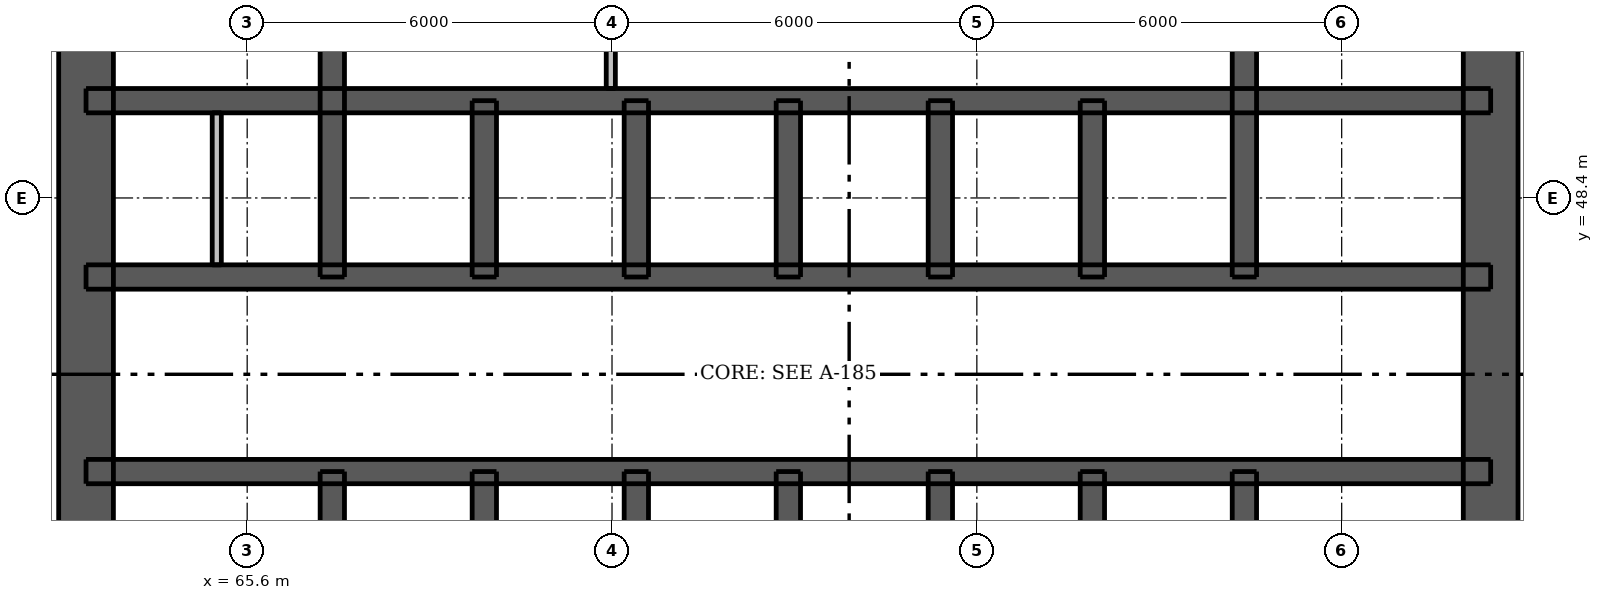
"""IFC4 building model, lengths in metres.
Left out: names, types, materials, properties, quantities, classifications, styles, units other than length and angle.
Written with IfcOpenShell. Run it as: python <this file> out.ifc"""

import sys

from ifc_helpers import new_model, si_unit, direction, frame, frame_2d, origin, place, context, subcontext, project, spatial, rectangle, extrude, element, fill, save


model = new_model("IFC4")
c1 = context("Model", 3, precision=1e-05, world=origin(), true_north=direction((0.0, 1.0)))
c2 = subcontext(c1, "Body", "Model", "MODEL_VIEW")
j1 = project(units=[si_unit("LENGTHUNIT", "METRE"), si_unit("PLANEANGLEUNIT", "RADIAN")], contexts=[c1])
p1 = place(None, origin())
s1 = spatial("IfcSite", under=j1, at=p1, CompositionType="ELEMENT")
p2 = place(p1, origin())
s2 = spatial("IfcBuilding", under=s1, at=p2, CompositionType="ELEMENT")
p3 = place(p2, frame((0.0, 0.0, 23.5)))
s3 = spatial("IfcBuildingStorey", under=s2, at=p3, CompositionType="ELEMENT", Elevation=23.5)
p4 = place(p3, frame((62.95, 33.5, 0.0), z_axis=(0.0, 0.0, 1.0), x_axis=(0.0, 1.0, 0.0)))
e1 = element("IfcWall", 1, at=p4, inside=s3, PredefinedType="SHEAR", context=c2, shape_type="SweptSolid", body=[
    extrude(rectangle(XDim=24.0, YDim=0.9, at=frame_2d((12.0, 0.0))), origin(), (0.0, 0.0, 1.0), 3.05),
])
p5 = place(p4, frame((11.2, 0.0, 0.0)))
e2 = element("IfcOpeningElement", 2, at=p5, cuts=e1, PredefinedType="OPENING", context=c2, shape_type="SweptSolid", body=[
    extrude(rectangle(XDim=1.6, YDim=2.1, at=frame_2d((0.8, 1.05))), frame((0.0, 0.46, 0.0), z_axis=(0.0, -1.0, 0.0), x_axis=(1.0, 0.0, 0.0)), (0.0, 0.0, 1.0), 0.92),
])
p6 = place(p3, frame((86.05, 33.5, 0.0), z_axis=(0.0, 0.0, 1.0), x_axis=(0.0, 1.0, 0.0)))
e3 = element("IfcWall", 3, at=p6, inside=s3, PredefinedType="SHEAR", context=c2, shape_type="SweptSolid", body=[
    extrude(rectangle(XDim=24.0, YDim=0.9, at=frame_2d((12.0, 0.0))), origin(), (0.0, 0.0, 1.0), 3.05),
])
p7 = place(p6, frame((11.2, 0.0, 0.0)))
e4 = element("IfcOpeningElement", 4, at=p7, cuts=e3, PredefinedType="OPENING", context=c2, shape_type="SweptSolid", body=[
    extrude(rectangle(XDim=1.6, YDim=2.1, at=frame_2d((0.8, 1.05))), frame((0.0, 0.46, 0.0), z_axis=(0.0, -1.0, 0.0), x_axis=(1.0, 0.0, 0.0)), (0.0, 0.0, 1.0), 0.92),
])
p8 = place(p3, frame((62.95, 43.9, 0.0), z_axis=(0.0, 0.0, 1.0), x_axis=(1.0, 0.0, 0.0)))
e5 = element("IfcWall", 5, at=p8, inside=s3, PredefinedType="SHEAR", context=c2, shape_type="SweptSolid", body=[
    extrude(rectangle(XDim=23.1, YDim=0.4, at=frame_2d((11.55, 0.0))), origin(), (0.0, 0.0, 1.0), 3.05),
])
p9 = place(p8, frame((1.7, 0.0, 0.0)))
e6 = element("IfcOpeningElement", 6, at=p9, cuts=e5, PredefinedType="OPENING", context=c2, shape_type="SweptSolid", body=[
    extrude(rectangle(XDim=0.9, YDim=2.1, at=frame_2d((0.45, 1.05))), frame((0.0, 0.21, 0.0), z_axis=(0.0, -1.0, 0.0), x_axis=(1.0, 0.0, 0.0)), (0.0, 0.0, 1.0), 0.42),
])
p10 = place(p8, frame((20.5, 0.0, 0.0)))
e7 = element("IfcOpeningElement", 7, at=p10, cuts=e5, PredefinedType="OPENING", context=c2, shape_type="SweptSolid", body=[
    extrude(rectangle(XDim=0.9, YDim=2.1, at=frame_2d((0.45, 1.05))), frame((0.0, 0.21, 0.0), z_axis=(0.0, -1.0, 0.0), x_axis=(1.0, 0.0, 0.0)), (0.0, 0.0, 1.0), 0.42),
])
p11 = place(p8, frame((4.75, 0.0, 0.0)))
e8 = element("IfcOpeningElement", 8, at=p11, cuts=e5, PredefinedType="OPENING", context=c2, shape_type="SweptSolid", body=[
    extrude(rectangle(XDim=1.1, YDim=2.1, at=frame_2d((0.55, 1.05))), frame((0.0, 0.21, 0.0), z_axis=(0.0, -1.0, 0.0), x_axis=(1.0, 0.0, 0.0)), (0.0, 0.0, 1.0), 0.42),
])
p12 = place(p8, frame((7.25, 0.0, 0.0)))
e9 = element("IfcOpeningElement", 9, at=p12, cuts=e5, PredefinedType="OPENING", context=c2, shape_type="SweptSolid", body=[
    extrude(rectangle(XDim=1.1, YDim=2.1, at=frame_2d((0.55, 1.05))), frame((0.0, 0.21, 0.0), z_axis=(0.0, -1.0, 0.0), x_axis=(1.0, 0.0, 0.0)), (0.0, 0.0, 1.0), 0.42),
])
p13 = place(p8, frame((9.75, 0.0, 0.0)))
e10 = element("IfcOpeningElement", 10, at=p13, cuts=e5, PredefinedType="OPENING", context=c2, shape_type="SweptSolid", body=[
    extrude(rectangle(XDim=1.1, YDim=2.1, at=frame_2d((0.55, 1.05))), frame((0.0, 0.21, 0.0), z_axis=(0.0, -1.0, 0.0), x_axis=(1.0, 0.0, 0.0)), (0.0, 0.0, 1.0), 0.42),
])
p14 = place(p8, frame((12.25, 0.0, 0.0)))
e11 = element("IfcOpeningElement", 11, at=p14, cuts=e5, PredefinedType="OPENING", context=c2, shape_type="SweptSolid", body=[
    extrude(rectangle(XDim=1.1, YDim=2.1, at=frame_2d((0.55, 1.05))), frame((0.0, 0.21, 0.0), z_axis=(0.0, -1.0, 0.0), x_axis=(1.0, 0.0, 0.0)), (0.0, 0.0, 1.0), 0.42),
])
p15 = place(p8, frame((14.75, 0.0, 0.0)))
e12 = element("IfcOpeningElement", 12, at=p15, cuts=e5, PredefinedType="OPENING", context=c2, shape_type="SweptSolid", body=[
    extrude(rectangle(XDim=1.1, YDim=2.1, at=frame_2d((0.55, 1.05))), frame((0.0, 0.21, 0.0), z_axis=(0.0, -1.0, 0.0), x_axis=(1.0, 0.0, 0.0)), (0.0, 0.0, 1.0), 0.42),
])
p16 = place(p8, frame((17.25, 0.0, 0.0)))
e13 = element("IfcOpeningElement", 13, at=p16, cuts=e5, PredefinedType="OPENING", context=c2, shape_type="SweptSolid", body=[
    extrude(rectangle(XDim=1.1, YDim=2.1, at=frame_2d((0.55, 1.05))), frame((0.0, 0.21, 0.0), z_axis=(0.0, -1.0, 0.0), x_axis=(1.0, 0.0, 0.0)), (0.0, 0.0, 1.0), 0.42),
])
p17 = place(p3, frame((62.95, 47.1, 0.0), z_axis=(0.0, 0.0, 1.0), x_axis=(1.0, 0.0, 0.0)))
e14 = element("IfcWall", 14, at=p17, inside=s3, PredefinedType="SHEAR", context=c2, shape_type="SweptSolid", body=[
    extrude(rectangle(XDim=23.1, YDim=0.4, at=frame_2d((11.55, 0.0))), origin(), (0.0, 0.0, 1.0), 3.05),
])
p18 = place(p17, frame((0.85, 0.0, 0.0)))
e15 = element("IfcOpeningElement", 15, at=p18, cuts=e14, PredefinedType="OPENING", context=c2, shape_type="SweptSolid", body=[
    extrude(rectangle(XDim=0.9, YDim=2.1, at=frame_2d((0.45, 1.05))), frame((0.0, 0.21, 0.0), z_axis=(0.0, -1.0, 0.0), x_axis=(1.0, 0.0, 0.0)), (0.0, 0.0, 1.0), 0.42),
])
p19 = place(p17, frame((2.55, 0.0, 0.0)))
e16 = element("IfcOpeningElement", 16, at=p19, cuts=e14, PredefinedType="OPENING", context=c2, shape_type="SweptSolid", body=[
    extrude(rectangle(XDim=0.9, YDim=2.1, at=frame_2d((0.45, 1.05))), frame((0.0, 0.21, 0.0), z_axis=(0.0, -1.0, 0.0), x_axis=(1.0, 0.0, 0.0)), (0.0, 0.0, 1.0), 0.42),
])
p20 = place(p17, frame((20.5, 0.0, 0.0)))
e17 = element("IfcOpeningElement", 17, at=p20, cuts=e14, PredefinedType="OPENING", context=c2, shape_type="SweptSolid", body=[
    extrude(rectangle(XDim=0.9, YDim=2.1, at=frame_2d((0.45, 1.05))), frame((0.0, 0.21, 0.0), z_axis=(0.0, -1.0, 0.0), x_axis=(1.0, 0.0, 0.0)), (0.0, 0.0, 1.0), 0.42),
])
p21 = place(p3, frame((62.95, 50.0, 0.0), z_axis=(0.0, 0.0, 1.0), x_axis=(1.0, 0.0, 0.0)))
e18 = element("IfcWall", 18, at=p21, inside=s3, PredefinedType="SHEAR", context=c2, shape_type="SweptSolid", body=[
    extrude(rectangle(XDim=23.1, YDim=0.4, at=frame_2d((11.55, 0.0))), origin(), (0.0, 0.0, 1.0), 3.05),
])
p22 = place(p3, frame((67.0, 33.95, 0.0), z_axis=(0.0, 0.0, 1.0), x_axis=(0.0, 1.0, 0.0)))
e19 = element("IfcWall", 19, at=p22, inside=s3, PredefinedType="SHEAR", context=c2, shape_type="SweptSolid", body=[
    extrude(rectangle(XDim=9.95, YDim=0.4, at=frame_2d((4.975, 0.0))), origin(), (0.0, 0.0, 1.0), 3.05),
])
p23 = place(p22, frame((0.65, 0.0, 0.0)))
e20 = element("IfcOpeningElement", 20, at=p23, cuts=e19, PredefinedType="OPENING", context=c2, shape_type="SweptSolid", body=[
    extrude(rectangle(XDim=1.1, YDim=2.1, at=frame_2d((0.55, 1.05))), frame((0.0, 0.21, 0.0), z_axis=(0.0, -1.0, 0.0), x_axis=(1.0, 0.0, 0.0)), (0.0, 0.0, 1.0), 0.42),
])
for number, where, z_axis, x_axis in (
    (21, (67.0, 47.1, 0.0), (0.0, 0.0, 1.0), (0.0, 1.0, 0.0)),
    (22, (82.0, 33.95, 0.0), (0.0, 0.0, 1.0), (0.0, 1.0, 0.0)),
    (23, (82.0, 47.1, 0.0), (0.0, 0.0, 1.0), (0.0, 1.0, 0.0)),
):
    element("IfcWall", number, at=place(p3, frame(where, z_axis=z_axis, x_axis=x_axis)), inside=s3, PredefinedType="SHEAR", context=c2, shape_type="SweptSolid", body=[
        extrude(rectangle(XDim=9.95, YDim=0.4, at=frame_2d((4.975, 0.0))), origin(), (0.0, 0.0, 1.0), 3.05),
    ])
for number, where, z_axis, x_axis in (
    (24, (69.5, 41.0, 0.0), (0.0, 0.0, 1.0), (0.0, 1.0, 0.0)),
    (25, (69.5, 47.1, 0.0), (0.0, 0.0, 1.0), (0.0, 1.0, 0.0)),
    (26, (72.0, 41.0, 0.0), (0.0, 0.0, 1.0), (0.0, 1.0, 0.0)),
    (27, (72.0, 47.1, 0.0), (0.0, 0.0, 1.0), (0.0, 1.0, 0.0)),
    (28, (74.5, 41.0, 0.0), (0.0, 0.0, 1.0), (0.0, 1.0, 0.0)),
    (29, (74.5, 47.1, 0.0), (0.0, 0.0, 1.0), (0.0, 1.0, 0.0)),
    (30, (77.0, 41.0, 0.0), (0.0, 0.0, 1.0), (0.0, 1.0, 0.0)),
    (31, (77.0, 47.1, 0.0), (0.0, 0.0, 1.0), (0.0, 1.0, 0.0)),
    (32, (79.5, 41.0, 0.0), (0.0, 0.0, 1.0), (0.0, 1.0, 0.0)),
    (33, (79.5, 47.1, 0.0), (0.0, 0.0, 1.0), (0.0, 1.0, 0.0)),
):
    element("IfcWall", number, at=place(p3, frame(where, z_axis=z_axis, x_axis=x_axis)), inside=s3, PredefinedType="SHEAR", context=c2, shape_type="SweptSolid", body=[
        extrude(rectangle(XDim=2.9, YDim=0.4, at=frame_2d((1.45, 0.0))), origin(), (0.0, 0.0, 1.0), 3.05),
    ])
p24 = place(p3, frame((65.1, 47.3, 0.0), z_axis=(0.0, 0.0, 1.0), x_axis=(0.0, 1.0, 0.0)))
e34 = element("IfcWall", 34, at=p24, inside=s3, PredefinedType="PLUMBINGWALL", context=c2, shape_type="SweptSolid", body=[
    extrude(rectangle(XDim=2.5, YDim=0.15, at=frame_2d((1.25, 0.0))), origin(), (0.0, 0.0, 1.0), 3.05),
])
p25 = place(p3, frame((71.58, 50.2, 0.0), z_axis=(0.0, 0.0, 1.0), x_axis=(0.0, 1.0, 0.0)))
e35 = element("IfcWall", 35, at=p25, inside=s3, PredefinedType="PLUMBINGWALL", context=c2, shape_type="SweptSolid", body=[
    extrude(rectangle(XDim=6.4, YDim=0.15, at=frame_2d((3.2, 0.0))), origin(), (0.0, 0.0, 1.0), 3.05),
])
p26 = place(p5, origin())
e36 = element("IfcDoor", 36, at=p26, inside=s3, OperationType="DOUBLE_DOOR_SINGLE_SWING", PredefinedType="DOOR", context=c2, shape_type="SweptSolid", body=[
    extrude(rectangle(XDim=1.6, YDim=2.1, at=frame_2d((0.8, 1.05))), frame((0.0, -0.388, 0.0), z_axis=(0.0, -1.0, 0.0), x_axis=(1.0, 0.0, 0.0)), (0.0, 0.0, 1.0), 0.05),
])
fill(e2, e36)
p27 = place(p7, origin())
e37 = element("IfcDoor", 37, at=p27, inside=s3, OperationType="DOUBLE_DOOR_SINGLE_SWING", PredefinedType="DOOR", context=c2, shape_type="SweptSolid", body=[
    extrude(rectangle(XDim=1.6, YDim=2.1, at=frame_2d((0.8, 1.05))), frame((0.0, 0.438, 0.0), z_axis=(0.0, -1.0, 0.0), x_axis=(1.0, 0.0, 0.0)), (0.0, 0.0, 1.0), 0.05),
])
fill(e4, e37)
p28 = place(p9, origin())
e38 = element("IfcDoor", 38, at=p28, inside=s3, OperationType="SINGLE_SWING_LEFT", PredefinedType="DOOR", context=c2, shape_type="SweptSolid", body=[
    extrude(rectangle(XDim=0.9, YDim=2.1, at=frame_2d((0.45, 1.05))), frame((0.0, -0.138, 0.0), z_axis=(0.0, -1.0, 0.0), x_axis=(1.0, 0.0, 0.0)), (0.0, 0.0, 1.0), 0.05),
])
fill(e6, e38)
p29 = place(p10, origin())
e39 = element("IfcDoor", 39, at=p29, inside=s3, OperationType="SINGLE_SWING_LEFT", PredefinedType="DOOR", context=c2, shape_type="SweptSolid", body=[
    extrude(rectangle(XDim=0.9, YDim=2.1, at=frame_2d((0.45, 1.05))), frame((0.0, -0.138, 0.0), z_axis=(0.0, -1.0, 0.0), x_axis=(1.0, 0.0, 0.0)), (0.0, 0.0, 1.0), 0.05),
])
fill(e7, e39)
p30 = place(p18, origin())
e40 = element("IfcDoor", 40, at=p30, inside=s3, OperationType="SINGLE_SWING_LEFT", PredefinedType="DOOR", context=c2, shape_type="SweptSolid", body=[
    extrude(rectangle(XDim=0.9, YDim=2.1, at=frame_2d((0.45, 1.05))), frame((0.0, 0.188, 0.0), z_axis=(0.0, -1.0, 0.0), x_axis=(1.0, 0.0, 0.0)), (0.0, 0.0, 1.0), 0.05),
])
fill(e15, e40)
p31 = place(p19, origin())
e41 = element("IfcDoor", 41, at=p31, inside=s3, OperationType="SINGLE_SWING_RIGHT", PredefinedType="DOOR", context=c2, shape_type="SweptSolid", body=[
    extrude(rectangle(XDim=0.9, YDim=2.1, at=frame_2d((0.45, 1.05))), frame((0.0, 0.188, 0.0), z_axis=(0.0, -1.0, 0.0), x_axis=(1.0, 0.0, 0.0)), (0.0, 0.0, 1.0), 0.05),
])
fill(e16, e41)
p32 = place(p20, origin())
e42 = element("IfcDoor", 42, at=p32, inside=s3, OperationType="SINGLE_SWING_LEFT", PredefinedType="DOOR", context=c2, shape_type="SweptSolid", body=[
    extrude(rectangle(XDim=0.9, YDim=2.1, at=frame_2d((0.45, 1.05))), frame((0.0, 0.188, 0.0), z_axis=(0.0, -1.0, 0.0), x_axis=(1.0, 0.0, 0.0)), (0.0, 0.0, 1.0), 0.05),
])
fill(e17, e42)
p33 = place(p11, origin())
e43 = element("IfcDoor", 43, at=p33, inside=s3, OperationType="DOUBLE_DOOR_SLIDING", PredefinedType="DOOR", context=c2, shape_type="SweptSolid", body=[
    extrude(rectangle(XDim=1.1, YDim=2.1, at=frame_2d((0.55, 1.05))), frame((0.0, 0.025, 0.0), z_axis=(0.0, -1.0, 0.0), x_axis=(1.0, 0.0, 0.0)), (0.0, 0.0, 1.0), 0.05),
])
fill(e8, e43)
p34 = place(p12, origin())
e44 = element("IfcDoor", 44, at=p34, inside=s3, OperationType="DOUBLE_DOOR_SLIDING", PredefinedType="DOOR", context=c2, shape_type="SweptSolid", body=[
    extrude(rectangle(XDim=1.1, YDim=2.1, at=frame_2d((0.55, 1.05))), frame((0.0, 0.025, 0.0), z_axis=(0.0, -1.0, 0.0), x_axis=(1.0, 0.0, 0.0)), (0.0, 0.0, 1.0), 0.05),
])
fill(e9, e44)
p35 = place(p13, origin())
e45 = element("IfcDoor", 45, at=p35, inside=s3, OperationType="DOUBLE_DOOR_SLIDING", PredefinedType="DOOR", context=c2, shape_type="SweptSolid", body=[
    extrude(rectangle(XDim=1.1, YDim=2.1, at=frame_2d((0.55, 1.05))), frame((0.0, 0.025, 0.0), z_axis=(0.0, -1.0, 0.0), x_axis=(1.0, 0.0, 0.0)), (0.0, 0.0, 1.0), 0.05),
])
fill(e10, e45)
p36 = place(p14, origin())
e46 = element("IfcDoor", 46, at=p36, inside=s3, OperationType="DOUBLE_DOOR_SLIDING", PredefinedType="DOOR", context=c2, shape_type="SweptSolid", body=[
    extrude(rectangle(XDim=1.1, YDim=2.1, at=frame_2d((0.55, 1.05))), frame((0.0, 0.025, 0.0), z_axis=(0.0, -1.0, 0.0), x_axis=(1.0, 0.0, 0.0)), (0.0, 0.0, 1.0), 0.05),
])
fill(e11, e46)
p37 = place(p15, origin())
e47 = element("IfcDoor", 47, at=p37, inside=s3, OperationType="DOUBLE_DOOR_SLIDING", PredefinedType="DOOR", context=c2, shape_type="SweptSolid", body=[
    extrude(rectangle(XDim=1.1, YDim=2.1, at=frame_2d((0.55, 1.05))), frame((0.0, 0.025, 0.0), z_axis=(0.0, -1.0, 0.0), x_axis=(1.0, 0.0, 0.0)), (0.0, 0.0, 1.0), 0.05),
])
fill(e12, e47)
p38 = place(p16, origin())
e48 = element("IfcDoor", 48, at=p38, inside=s3, OperationType="DOUBLE_DOOR_SLIDING", PredefinedType="DOOR", context=c2, shape_type="SweptSolid", body=[
    extrude(rectangle(XDim=1.1, YDim=2.1, at=frame_2d((0.55, 1.05))), frame((0.0, 0.025, 0.0), z_axis=(0.0, -1.0, 0.0), x_axis=(1.0, 0.0, 0.0)), (0.0, 0.0, 1.0), 0.05),
])
fill(e13, e48)
save(model, sys.argv[1])
